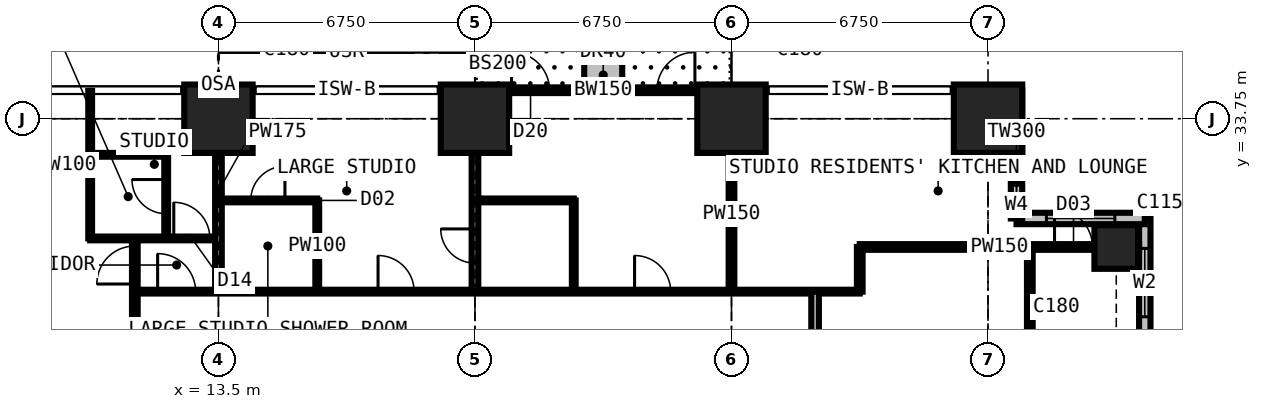
"""IFC4 building model, lengths in metres.
Left out: names, types, materials, properties, quantities, classifications, styles, units other than length and angle.
Written with IfcOpenShell. Run it as: python <this file> out.ifc"""

import sys

from ifc_helpers import new_model, si_unit, direction, frame, frame_2d, origin, origin_2d, place, context, subcontext, project, spatial, rectangle, extrude, element, fill, save


model = new_model("IFC4")
c1 = context("Model", 3, precision=1e-05, world=origin(), true_north=direction((0.0, 1.0)))
c2 = subcontext(c1, "Body", "Model", "MODEL_VIEW")
j1 = project(units=[si_unit("LENGTHUNIT", "METRE"), si_unit("PLANEANGLEUNIT", "RADIAN")], contexts=[c1])
p1 = place(None, origin())
s1 = spatial("IfcSite", under=j1, at=p1, CompositionType="ELEMENT")
p2 = place(p1, origin())
s2 = spatial("IfcBuilding", under=s1, at=p2, CompositionType="ELEMENT")
p3 = place(p2, frame((0.0, 0.0, 90.9)))
s3 = spatial("IfcBuildingStorey", under=s2, at=p3, CompositionType="ELEMENT", Elevation=90.9)
for number, where, z_axis, x_axis in (
    (1, (13.5, 33.75, 0.0), (0.0, 0.0, 1.0), (1.0, 0.0, 0.0)),
    (2, (20.25, 33.75, 0.0), (0.0, 0.0, 1.0), (1.0, 0.0, 0.0)),
    (3, (27.0, 33.75, 0.0), (0.0, 0.0, 1.0), (1.0, 0.0, 0.0)),
    (4, (33.75, 33.75, 0.0), (0.0, 0.0, 1.0), (1.0, 0.0, 0.0)),
):
    element("IfcColumn", number, at=place(p3, frame(where, z_axis=z_axis, x_axis=x_axis)), inside=s3, PredefinedType="COLUMN", context=c2, shape_type="SweptSolid", body=[
        extrude(rectangle(XDim=1.8, YDim=1.8, at=origin_2d()), origin(), (0.0, 0.0, 1.0), 3.6),
    ])
p4 = place(p3, frame((37.125, 30.375, 0.0), z_axis=(0.0, 0.0, 1.0), x_axis=(1.0, 0.0, 0.0)))
e5 = element("IfcColumn", 5, at=p4, inside=s3, PredefinedType="COLUMN", context=c2, shape_type="SweptSolid", body=[
    extrude(rectangle(XDim=1.15, YDim=1.15, at=origin_2d()), origin(), (0.0, 0.0, 1.0), 3.6),
])
p5 = place(p3, frame((37.875, 27.75, 0.0), z_axis=(0.0, 0.0, 1.0), x_axis=(0.0, 1.0, 0.0)))
e6 = element("IfcWall", 6, at=p5, inside=s3, PredefinedType="SOLIDWALL", context=c2, shape_type="SweptSolid", body=[
    extrude(rectangle(XDim=3.375, YDim=0.3, at=frame_2d((1.688, 0.0))), origin(), (0.0, 0.0, 1.0), 3.375),
])
p6 = place(p5, frame((0.788, 0.0, 0.6)))
e7 = element("IfcOpeningElement", 7, at=p6, cuts=e6, PredefinedType="OPENING", context=c2, shape_type="SweptSolid", body=[
    extrude(rectangle(XDim=1.8, YDim=2.1, at=frame_2d((0.9, 1.05))), frame((0.0, 0.16, 0.0), z_axis=(0.0, -1.0, 0.0), x_axis=(1.0, 0.0, 0.0)), (0.0, 0.0, 1.0), 0.32),
])
p7 = place(p3, frame((37.875, 31.125, 0.0), z_axis=(0.0, 0.0, 1.0), x_axis=(-1.0, 0.0, 0.0)))
e8 = element("IfcWall", 8, at=p7, inside=s3, PredefinedType="SOLIDWALL", context=c2, shape_type="SweptSolid", body=[
    extrude(rectangle(XDim=3.375, YDim=0.3, at=frame_2d((1.688, 0.0))), origin(), (0.0, 0.0, 1.0), 3.375),
])
p8 = place(p7, frame((0.788, 0.0, 0.6)))
e9 = element("IfcOpeningElement", 9, at=p8, cuts=e8, PredefinedType="OPENING", context=c2, shape_type="SweptSolid", body=[
    extrude(rectangle(XDim=1.8, YDim=2.1, at=frame_2d((0.9, 1.05))), frame((0.0, 0.16, 0.0), z_axis=(0.0, -1.0, 0.0), x_axis=(1.0, 0.0, 0.0)), (0.0, 0.0, 1.0), 0.32),
])
p9 = place(p3, frame((34.5, 31.125, 0.0), z_axis=(0.0, 0.0, 1.0), x_axis=(0.0, 1.0, 0.0)))
e10 = element("IfcWall", 10, at=p9, inside=s3, PredefinedType="SOLIDWALL", context=c2, shape_type="SweptSolid", body=[
    extrude(rectangle(XDim=3.375, YDim=0.3, at=frame_2d((1.688, 0.0))), origin(), (0.0, 0.0, 1.0), 3.375),
])
p10 = place(p9, frame((0.343, 0.0, 0.9)))
e11 = element("IfcOpeningElement", 11, at=p10, cuts=e10, PredefinedType="OPENING", context=c2, shape_type="SweptSolid", body=[
    extrude(rectangle(XDim=1.2, YDim=1.8, at=frame_2d((0.6, 0.9))), frame((0.0, 0.16, 0.0), z_axis=(0.0, -1.0, 0.0), x_axis=(1.0, 0.0, 0.0)), (0.0, 0.0, 1.0), 0.32),
])
p11 = place(p3, frame((20.25, 34.5, 0.0), z_axis=(0.0, 0.0, 1.0), x_axis=(1.0, 0.0, 0.0)))
e12 = element("IfcWall", 12, at=p11, inside=s3, PredefinedType="SOLIDWALL", context=c2, shape_type="SweptSolid", body=[
    extrude(rectangle(XDim=6.75, YDim=0.15, at=frame_2d((3.375, 0.0))), origin(), (0.0, 0.0, 1.0), 3.375),
])
p12 = place(p11, frame((0.962, 0.0, 0.0)))
e13 = element("IfcOpeningElement", 13, at=p12, cuts=e12, PredefinedType="OPENING", context=c2, shape_type="SweptSolid", body=[
    extrude(rectangle(XDim=1.0, YDim=2.2, at=frame_2d((0.5, 1.1))), frame((0.0, 0.085, 0.0), z_axis=(0.0, -1.0, 0.0), x_axis=(1.0, 0.0, 0.0)), (0.0, 0.0, 1.0), 0.17),
])
p13 = place(p11, frame((2.025, 0.0, 0.9)))
e14 = element("IfcOpeningElement", 14, at=p13, cuts=e12, PredefinedType="OPENING", context=c2, shape_type="SweptSolid", body=[
    extrude(rectangle(XDim=1.2, YDim=1.8, at=frame_2d((0.6, 0.9))), frame((0.0, 0.085, 0.0), z_axis=(0.0, -1.0, 0.0), x_axis=(1.0, 0.0, 0.0)), (0.0, 0.0, 1.0), 0.17),
])
p14 = place(p11, frame((4.788, 0.0, 0.0)))
e15 = element("IfcOpeningElement", 15, at=p14, cuts=e12, PredefinedType="OPENING", context=c2, shape_type="SweptSolid", body=[
    extrude(rectangle(XDim=1.0, YDim=2.2, at=frame_2d((0.5, 1.1))), frame((0.0, 0.085, 0.0), z_axis=(0.0, -1.0, 0.0), x_axis=(1.0, 0.0, 0.0)), (0.0, 0.0, 1.0), 0.17),
])
p15 = place(p11, frame((3.525, 0.0, 0.9)))
e16 = element("IfcOpeningElement", 16, at=p15, cuts=e12, PredefinedType="OPENING", context=c2, shape_type="SweptSolid", body=[
    extrude(rectangle(XDim=1.2, YDim=1.8, at=frame_2d((0.6, 0.9))), frame((0.0, 0.085, 0.0), z_axis=(0.0, -1.0, 0.0), x_axis=(1.0, 0.0, 0.0)), (0.0, 0.0, 1.0), 0.17),
])
p16 = place(p3, frame((23.625, 34.6, 0.0), z_axis=(0.0, 0.0, 1.0), x_axis=(0.0, 1.0, 0.0)))
e17 = element("IfcWall", 17, at=p16, inside=s3, PredefinedType="USERDEFINED", context=c2, shape_type="SweptSolid", body=[
    extrude(rectangle(XDim=2.2, YDim=1.0, at=frame_2d((1.1, 0.0))), origin(), (0.0, 0.0, 1.0), 0.9),
])
p17 = place(p3, frame((10.125, 30.6, 0.0), z_axis=(0.0, 0.0, 1.0), x_axis=(0.0, 1.0, 0.0)))
e18 = element("IfcWall", 18, at=p17, inside=s3, PredefinedType="PARTITIONING", context=c2, shape_type="SweptSolid", body=[
    extrude(rectangle(XDim=3.884, YDim=0.1, at=frame_2d((1.942, 0.0))), origin(), (0.0, 0.0, 1.0), 3.375),
])
p18 = place(p3, frame((10.125, 30.6, 0.0), z_axis=(0.0, 0.0, 1.0), x_axis=(1.0, 0.0, 0.0)))
e19 = element("IfcWall", 19, at=p18, inside=s3, PredefinedType="PARTITIONING", context=c2, shape_type="SweptSolid", body=[
    extrude(rectangle(XDim=3.375, YDim=0.1, at=frame_2d((1.688, 0.0))), origin(), (0.0, 0.0, 1.0), 3.375),
])
p19 = place(p18, frame((2.2, 0.0, 0.0)))
e20 = element("IfcOpeningElement", 20, at=p19, cuts=e19, PredefinedType="OPENING", context=c2, shape_type="SweptSolid", body=[
    extrude(rectangle(XDim=0.95, YDim=2.2, at=frame_2d((0.475, 1.1))), frame((0.0, 0.06, 0.0), z_axis=(0.0, -1.0, 0.0), x_axis=(1.0, 0.0, 0.0)), (0.0, 0.0, 1.0), 0.12),
])
p20 = place(p3, frame((10.125, 32.8, 0.0), z_axis=(0.0, 0.0, 1.0), x_axis=(1.0, 0.0, 0.0)))
e21 = element("IfcWall", 21, at=p20, inside=s3, PredefinedType="PARTITIONING", context=c2, shape_type="SweptSolid", body=[
    extrude(rectangle(XDim=2.0, YDim=0.1, at=frame_2d((1.0, 0.0))), origin(), (0.0, 0.0, 1.0), 3.375),
])
p21 = place(p3, frame((11.3, 11.3, 0.0), z_axis=(0.0, 0.0, 1.0), x_axis=(0.0, 1.0, 0.0)))
e22 = element("IfcWall", 22, at=p21, inside=s3, PredefinedType="PARTITIONING", context=c2, shape_type="SweptSolid", body=[
    extrude(rectangle(XDim=19.3, YDim=0.15, at=frame_2d((9.65, 0.0))), origin(), (0.0, 0.0, 1.0), 3.375),
])
p22 = place(p21, frame((18.1, 0.0, 0.0)))
e23 = element("IfcOpeningElement", 23, at=p22, cuts=e22, PredefinedType="OPENING", context=c2, shape_type="SweptSolid", body=[
    extrude(rectangle(XDim=1.0, YDim=2.2, at=frame_2d((0.5, 1.1))), frame((0.0, 0.085, 0.0), z_axis=(0.0, -1.0, 0.0), x_axis=(1.0, 0.0, 0.0)), (0.0, 0.0, 1.0), 0.17),
])
p23 = place(p21, frame((10.137, 0.0, 0.0)))
e24 = element("IfcOpeningElement", 24, at=p23, cuts=e22, PredefinedType="OPENING", context=c2, shape_type="SweptSolid", body=[
    extrude(rectangle(XDim=1.0, YDim=2.2, at=frame_2d((0.5, 1.1))), frame((0.0, 0.085, 0.0), z_axis=(0.0, -1.0, 0.0), x_axis=(1.0, 0.0, 0.0)), (0.0, 0.0, 1.0), 0.17),
])
p24 = place(p3, frame((11.3, 29.2, 0.0), z_axis=(0.0, 0.0, 1.0), x_axis=(1.0, 0.0, 0.0)))
e25 = element("IfcWall", 25, at=p24, inside=s3, PredefinedType="PARTITIONING", context=c2, shape_type="SweptSolid", body=[
    extrude(rectangle(XDim=19.075, YDim=0.1, at=frame_2d((9.538, 0.0))), origin(), (0.0, 0.0, 1.0), 3.375),
])
p25 = place(p24, frame((6.4, 0.0, 0.0)))
e26 = element("IfcOpeningElement", 26, at=p25, cuts=e25, PredefinedType="OPENING", context=c2, shape_type="SweptSolid", body=[
    extrude(rectangle(XDim=0.95, YDim=2.2, at=frame_2d((0.475, 1.1))), frame((0.0, 0.06, 0.0), z_axis=(0.0, -1.0, 0.0), x_axis=(1.0, 0.0, 0.0)), (0.0, 0.0, 1.0), 0.12),
])
p26 = place(p24, frame((13.15, 0.0, 0.0)))
e27 = element("IfcOpeningElement", 27, at=p26, cuts=e25, PredefinedType="OPENING", context=c2, shape_type="SweptSolid", body=[
    extrude(rectangle(XDim=0.95, YDim=2.2, at=frame_2d((0.475, 1.1))), frame((0.0, 0.06, 0.0), z_axis=(0.0, -1.0, 0.0), x_axis=(1.0, 0.0, 0.0)), (0.0, 0.0, 1.0), 0.12),
])
p27 = place(p24, frame((0.6, 0.0, 0.0)))
e28 = element("IfcOpeningElement", 28, at=p27, cuts=e25, PredefinedType="OPENING", context=c2, shape_type="SweptSolid", body=[
    extrude(rectangle(XDim=1.0, YDim=2.2, at=frame_2d((0.5, 1.1))), frame((0.0, 0.06, 0.0), z_axis=(0.0, -1.0, 0.0), x_axis=(1.0, 0.0, 0.0)), (0.0, 0.0, 1.0), 0.12),
])
p28 = place(p3, frame((12.125, 30.6, 0.0), z_axis=(0.0, 0.0, 1.0), x_axis=(0.0, 1.0, 0.0)))
e29 = element("IfcWall", 29, at=p28, inside=s3, PredefinedType="PARTITIONING", context=c2, shape_type="SweptSolid", body=[
    extrude(rectangle(XDim=2.2, YDim=0.1, at=frame_2d((1.1, 0.0))), origin(), (0.0, 0.0, 1.0), 3.375),
])
p29 = place(p28, frame((0.65, 0.0, 0.0)))
e30 = element("IfcOpeningElement", 30, at=p29, cuts=e29, PredefinedType="OPENING", context=c2, shape_type="SweptSolid", body=[
    extrude(rectangle(XDim=0.9, YDim=2.2, at=frame_2d((0.45, 1.1))), frame((0.0, 0.06, 0.0), z_axis=(0.0, -1.0, 0.0), x_axis=(1.0, 0.0, 0.0)), (0.0, 0.0, 1.0), 0.12),
])
p30 = place(p3, frame((13.5, 29.2, 0.0), z_axis=(0.0, 0.0, 1.0), x_axis=(0.0, 1.0, 0.0)))
e31 = element("IfcWall", 31, at=p30, inside=s3, PredefinedType="PARTITIONING", context=c2, shape_type="SweptSolid", body=[
    extrude(rectangle(XDim=5.284, YDim=0.175, at=frame_2d((2.642, 0.0))), origin(), (0.0, 0.0, 1.0), 2.61),
])
p31 = place(p3, frame((13.5, 31.6, 0.0), z_axis=(0.0, 0.0, 1.0), x_axis=(1.0, 0.0, 0.0)))
e32 = element("IfcWall", 32, at=p31, inside=s3, PredefinedType="PARTITIONING", context=c2, shape_type="SweptSolid", body=[
    extrude(rectangle(XDim=2.6, YDim=0.1, at=frame_2d((1.3, 0.0))), origin(), (0.0, 0.0, 1.0), 3.375),
])
p32 = place(p31, frame((0.85, 0.0, 0.0)))
e33 = element("IfcOpeningElement", 33, at=p32, cuts=e32, PredefinedType="OPENING", context=c2, shape_type="SweptSolid", body=[
    extrude(rectangle(XDim=0.9, YDim=2.2, at=frame_2d((0.45, 1.1))), frame((0.0, 0.06, 0.0), z_axis=(0.0, -1.0, 0.0), x_axis=(1.0, 0.0, 0.0)), (0.0, 0.0, 1.0), 0.12),
])
p33 = place(p3, frame((16.1, 29.2, 0.0), z_axis=(0.0, 0.0, 1.0), x_axis=(0.0, 1.0, 0.0)))
e34 = element("IfcWall", 34, at=p33, inside=s3, PredefinedType="PARTITIONING", context=c2, shape_type="SweptSolid", body=[
    extrude(rectangle(XDim=2.4, YDim=0.1, at=frame_2d((1.2, 0.0))), origin(), (0.0, 0.0, 1.0), 3.375),
])
p34 = place(p3, frame((20.25, 29.2, 0.0), z_axis=(0.0, 0.0, 1.0), x_axis=(0.0, 1.0, 0.0)))
e35 = element("IfcWall", 35, at=p34, inside=s3, PredefinedType="PARTITIONING", context=c2, shape_type="SweptSolid", body=[
    extrude(rectangle(XDim=5.284, YDim=0.175, at=frame_2d((2.642, 0.0))), origin(), (0.0, 0.0, 1.0), 2.61),
])
p35 = place(p34, frame((0.75, 0.0, 0.0)))
e36 = element("IfcOpeningElement", 36, at=p35, cuts=e35, PredefinedType="OPENING", context=c2, shape_type="SweptSolid", body=[
    extrude(rectangle(XDim=0.9, YDim=2.2, at=frame_2d((0.45, 1.1))), frame((0.0, 0.097, 0.0), z_axis=(0.0, -1.0, 0.0), x_axis=(1.0, 0.0, 0.0)), (0.0, 0.0, 1.0), 0.195),
])
p36 = place(p3, frame((20.25, 31.6, 0.0), z_axis=(0.0, 0.0, 1.0), x_axis=(1.0, 0.0, 0.0)))
e37 = element("IfcWall", 37, at=p36, inside=s3, PredefinedType="PARTITIONING", context=c2, shape_type="SweptSolid", body=[
    extrude(rectangle(XDim=2.6, YDim=0.1, at=frame_2d((1.3, 0.0))), origin(), (0.0, 0.0, 1.0), 3.375),
])
p37 = place(p3, frame((22.85, 29.2, 0.0), z_axis=(0.0, 0.0, 1.0), x_axis=(0.0, 1.0, 0.0)))
e38 = element("IfcWall", 38, at=p37, inside=s3, PredefinedType="PARTITIONING", context=c2, shape_type="SweptSolid", body=[
    extrude(rectangle(XDim=2.4, YDim=0.1, at=frame_2d((1.2, 0.0))), origin(), (0.0, 0.0, 1.0), 3.375),
])
p38 = place(p3, frame((27.0, 29.2, 0.0), z_axis=(0.0, 0.0, 1.0), x_axis=(0.0, 1.0, 0.0)))
e39 = element("IfcWall", 39, at=p38, inside=s3, PredefinedType="PARTITIONING", context=c2, shape_type="SweptSolid", body=[
    extrude(rectangle(XDim=5.284, YDim=0.15, at=frame_2d((2.642, 0.0))), origin(), (0.0, 0.0, 1.0), 2.806),
])
p39 = place(p3, frame((29.2, 11.3, 0.0), z_axis=(0.0, 0.0, 1.0), x_axis=(0.0, 1.0, 0.0)))
e40 = element("IfcWall", 40, at=p39, inside=s3, PredefinedType="PARTITIONING", context=c2, shape_type="SweptSolid", body=[
    extrude(rectangle(XDim=17.9, YDim=0.2, at=frame_2d((8.95, 0.0))), origin(), (0.0, 0.0, 1.0), 3.375),
])
p40 = place(p39, frame((8.35, 0.0, 0.0)))
e41 = element("IfcOpeningElement", 41, at=p40, cuts=e40, PredefinedType="OPENING", context=c2, shape_type="SweptSolid", body=[
    extrude(rectangle(XDim=1.2, YDim=2.2, at=frame_2d((0.6, 1.1))), frame((0.0, 0.11, 0.0), z_axis=(0.0, -1.0, 0.0), x_axis=(1.0, 0.0, 0.0)), (0.0, 0.0, 1.0), 0.22),
])
p41 = place(p3, frame((30.375, 29.2, 0.0), z_axis=(0.0, 0.0, 1.0), x_axis=(0.0, 1.0, 0.0)))
e42 = element("IfcWall", 42, at=p41, inside=s3, PredefinedType="PARTITIONING", context=c2, shape_type="SweptSolid", body=[
    extrude(rectangle(XDim=1.175, YDim=0.15, at=frame_2d((0.587, 0.0))), origin(), (0.0, 0.0, 1.0), 3.375),
])
p42 = place(p3, frame((30.375, 30.375, 0.0), z_axis=(0.0, 0.0, 1.0), x_axis=(1.0, 0.0, 0.0)))
e43 = element("IfcWall", 43, at=p42, inside=s3, PredefinedType="PARTITIONING", context=c2, shape_type="SweptSolid", body=[
    extrude(rectangle(XDim=7.35, YDim=0.15, at=frame_2d((3.675, 0.0))), origin(), (0.0, 0.0, 1.0), 2.877),
])
p43 = place(p42, frame((5.125, 0.0, 0.0)))
e44 = element("IfcOpeningElement", 44, at=p43, cuts=e43, PredefinedType="OPENING", context=c2, shape_type="SweptSolid", body=[
    extrude(rectangle(XDim=1.0, YDim=2.2, at=frame_2d((0.5, 1.1))), frame((0.0, 0.085, 0.0), z_axis=(0.0, -1.0, 0.0), x_axis=(1.0, 0.0, 0.0)), (0.0, 0.0, 1.0), 0.17),
])
p44 = place(p3, frame((34.85, 12.55, 0.0), z_axis=(0.0, 0.0, 1.0), x_axis=(0.0, 1.0, 0.0)))
e45 = element("IfcWall", 45, at=p44, inside=s3, PredefinedType="PARTITIONING", context=c2, shape_type="SweptSolid", body=[
    extrude(rectangle(XDim=17.825, YDim=0.15, at=frame_2d((8.913, 0.0))), origin(), (0.0, 0.0, 1.0), 3.375),
])
p45 = place(p44, frame((8.6, 0.0, 0.0)))
e46 = element("IfcOpeningElement", 46, at=p45, cuts=e45, PredefinedType="OPENING", context=c2, shape_type="SweptSolid", body=[
    extrude(rectangle(XDim=0.95, YDim=2.2, at=frame_2d((0.475, 1.1))), frame((0.0, 0.085, 0.0), z_axis=(0.0, -1.0, 0.0), x_axis=(1.0, 0.0, 0.0)), (0.0, 0.0, 1.0), 0.17),
])
p46 = place(p6, origin())
e47 = element("IfcWindow", 47, at=p46, inside=s3, PartitioningType="SINGLE_PANEL", PredefinedType="WINDOW", context=c2, shape_type="SweptSolid", body=[
    extrude(rectangle(XDim=1.8, YDim=2.1, at=frame_2d((0.9, 1.05))), frame((0.0, 0.03, 0.0), z_axis=(0.0, -1.0, 0.0), x_axis=(1.0, 0.0, 0.0)), (0.0, 0.0, 1.0), 0.06),
])
fill(e7, e47)
p47 = place(p8, origin())
e48 = element("IfcWindow", 48, at=p47, inside=s3, PartitioningType="SINGLE_PANEL", PredefinedType="WINDOW", context=c2, shape_type="SweptSolid", body=[
    extrude(rectangle(XDim=1.8, YDim=2.1, at=frame_2d((0.9, 1.05))), frame((0.0, 0.03, 0.0), z_axis=(0.0, -1.0, 0.0), x_axis=(1.0, 0.0, 0.0)), (0.0, 0.0, 1.0), 0.06),
])
fill(e9, e48)
p48 = place(p10, origin())
e49 = element("IfcWindow", 49, at=p48, inside=s3, PartitioningType="SINGLE_PANEL", PredefinedType="WINDOW", context=c2, shape_type="SweptSolid", body=[
    extrude(rectangle(XDim=1.2, YDim=1.8, at=frame_2d((0.6, 0.9))), frame((0.0, 0.03, 0.0), z_axis=(0.0, -1.0, 0.0), x_axis=(1.0, 0.0, 0.0)), (0.0, 0.0, 1.0), 0.06),
])
fill(e11, e49)
p49 = place(p12, origin())
e50 = element("IfcDoor", 50, at=p49, inside=s3, OperationType="SINGLE_SWING_LEFT", PredefinedType="DOOR", context=c2, shape_type="SweptSolid", body=[
    extrude(rectangle(XDim=1.0, YDim=2.2, at=frame_2d((0.5, 1.1))), frame((0.0, 0.025, 0.0), z_axis=(0.0, -1.0, 0.0), x_axis=(1.0, 0.0, 0.0)), (0.0, 0.0, 1.0), 0.05),
])
fill(e13, e50)
p50 = place(p13, origin())
e51 = element("IfcWindow", 51, at=p50, inside=s3, PartitioningType="SINGLE_PANEL", PredefinedType="WINDOW", context=c2, shape_type="SweptSolid", body=[
    extrude(rectangle(XDim=1.2, YDim=1.8, at=frame_2d((0.6, 0.9))), frame((0.0, 0.03, 0.0), z_axis=(0.0, -1.0, 0.0), x_axis=(1.0, 0.0, 0.0)), (0.0, 0.0, 1.0), 0.06),
])
fill(e14, e51)
p51 = place(p14, origin())
e52 = element("IfcDoor", 52, at=p51, inside=s3, OperationType="SINGLE_SWING_RIGHT", PredefinedType="DOOR", context=c2, shape_type="SweptSolid", body=[
    extrude(rectangle(XDim=1.0, YDim=2.2, at=frame_2d((0.5, 1.1))), frame((0.0, 0.025, 0.0), z_axis=(0.0, -1.0, 0.0), x_axis=(1.0, 0.0, 0.0)), (0.0, 0.0, 1.0), 0.05),
])
fill(e15, e52)
p52 = place(p15, origin())
e53 = element("IfcWindow", 53, at=p52, inside=s3, PartitioningType="SINGLE_PANEL", PredefinedType="WINDOW", context=c2, shape_type="SweptSolid", body=[
    extrude(rectangle(XDim=1.2, YDim=1.8, at=frame_2d((0.6, 0.9))), frame((0.0, 0.03, 0.0), z_axis=(0.0, -1.0, 0.0), x_axis=(1.0, 0.0, 0.0)), (0.0, 0.0, 1.0), 0.06),
])
fill(e16, e53)
p53 = place(p43, origin())
e54 = element("IfcDoor", 54, at=p53, inside=s3, OperationType="SINGLE_SWING_LEFT", PredefinedType="DOOR", context=c2, shape_type="SweptSolid", body=[
    extrude(rectangle(XDim=1.0, YDim=2.2, at=frame_2d((0.5, 1.1))), frame((0.0, 0.025, 0.0), z_axis=(0.0, -1.0, 0.0), x_axis=(1.0, 0.0, 0.0)), (0.0, 0.0, 1.0), 0.05),
])
fill(e44, e54)
p54 = place(p25, origin())
e55 = element("IfcDoor", 55, at=p54, inside=s3, OperationType="SINGLE_SWING_LEFT", PredefinedType="DOOR", context=c2, shape_type="SweptSolid", body=[
    extrude(rectangle(XDim=0.95, YDim=2.2, at=frame_2d((0.475, 1.1))), frame((0.0, 0.025, 0.0), z_axis=(0.0, -1.0, 0.0), x_axis=(1.0, 0.0, 0.0)), (0.0, 0.0, 1.0), 0.05),
])
fill(e26, e55)
p55 = place(p32, origin())
e56 = element("IfcDoor", 56, at=p55, inside=s3, OperationType="SINGLE_SWING_RIGHT", PredefinedType="DOOR", context=c2, shape_type="SweptSolid", body=[
    extrude(rectangle(XDim=0.9, YDim=2.2, at=frame_2d((0.45, 1.1))), frame((0.0, 0.025, 0.0), z_axis=(0.0, -1.0, 0.0), x_axis=(1.0, 0.0, 0.0)), (0.0, 0.0, 1.0), 0.05),
])
fill(e33, e56)
p56 = place(p26, origin())
e57 = element("IfcDoor", 57, at=p56, inside=s3, OperationType="SINGLE_SWING_LEFT", PredefinedType="DOOR", context=c2, shape_type="SweptSolid", body=[
    extrude(rectangle(XDim=0.95, YDim=2.2, at=frame_2d((0.475, 1.1))), frame((0.0, 0.025, 0.0), z_axis=(0.0, -1.0, 0.0), x_axis=(1.0, 0.0, 0.0)), (0.0, 0.0, 1.0), 0.05),
])
fill(e27, e57)
p57 = place(p35, origin())
e58 = element("IfcDoor", 58, at=p57, inside=s3, OperationType="SINGLE_SWING_RIGHT", PredefinedType="DOOR", context=c2, shape_type="SweptSolid", body=[
    extrude(rectangle(XDim=0.9, YDim=2.2, at=frame_2d((0.45, 1.1))), frame((0.0, 0.025, 0.0), z_axis=(0.0, -1.0, 0.0), x_axis=(1.0, 0.0, 0.0)), (0.0, 0.0, 1.0), 0.05),
])
fill(e36, e58)
p58 = place(p19, origin())
e59 = element("IfcDoor", 59, at=p58, inside=s3, OperationType="SINGLE_SWING_LEFT", PredefinedType="DOOR", context=c2, shape_type="SweptSolid", body=[
    extrude(rectangle(XDim=0.95, YDim=2.2, at=frame_2d((0.475, 1.1))), frame((0.0, 0.025, 0.0), z_axis=(0.0, -1.0, 0.0), x_axis=(1.0, 0.0, 0.0)), (0.0, 0.0, 1.0), 0.05),
])
fill(e20, e59)
p59 = place(p29, origin())
e60 = element("IfcDoor", 60, at=p59, inside=s3, OperationType="SINGLE_SWING_RIGHT", PredefinedType="DOOR", context=c2, shape_type="SweptSolid", body=[
    extrude(rectangle(XDim=0.9, YDim=2.2, at=frame_2d((0.45, 1.1))), frame((0.0, 0.025, 0.0), z_axis=(0.0, -1.0, 0.0), x_axis=(1.0, 0.0, 0.0)), (0.0, 0.0, 1.0), 0.05),
])
fill(e30, e60)
p60 = place(p27, origin())
e61 = element("IfcDoor", 61, at=p60, inside=s3, OperationType="SINGLE_SWING_LEFT", PredefinedType="DOOR", context=c2, shape_type="SweptSolid", body=[
    extrude(rectangle(XDim=1.0, YDim=2.2, at=frame_2d((0.5, 1.1))), frame((0.0, 0.025, 0.0), z_axis=(0.0, -1.0, 0.0), x_axis=(1.0, 0.0, 0.0)), (0.0, 0.0, 1.0), 0.05),
])
fill(e28, e61)
p61 = place(p22, origin())
e62 = element("IfcDoor", 62, at=p61, inside=s3, OperationType="SINGLE_SWING_LEFT", PredefinedType="DOOR", context=c2, shape_type="SweptSolid", body=[
    extrude(rectangle(XDim=1.0, YDim=2.2, at=frame_2d((0.5, 1.1))), frame((0.0, 0.025, 0.0), z_axis=(0.0, -1.0, 0.0), x_axis=(1.0, 0.0, 0.0)), (0.0, 0.0, 1.0), 0.05),
])
fill(e23, e62)
save(model, sys.argv[1])
